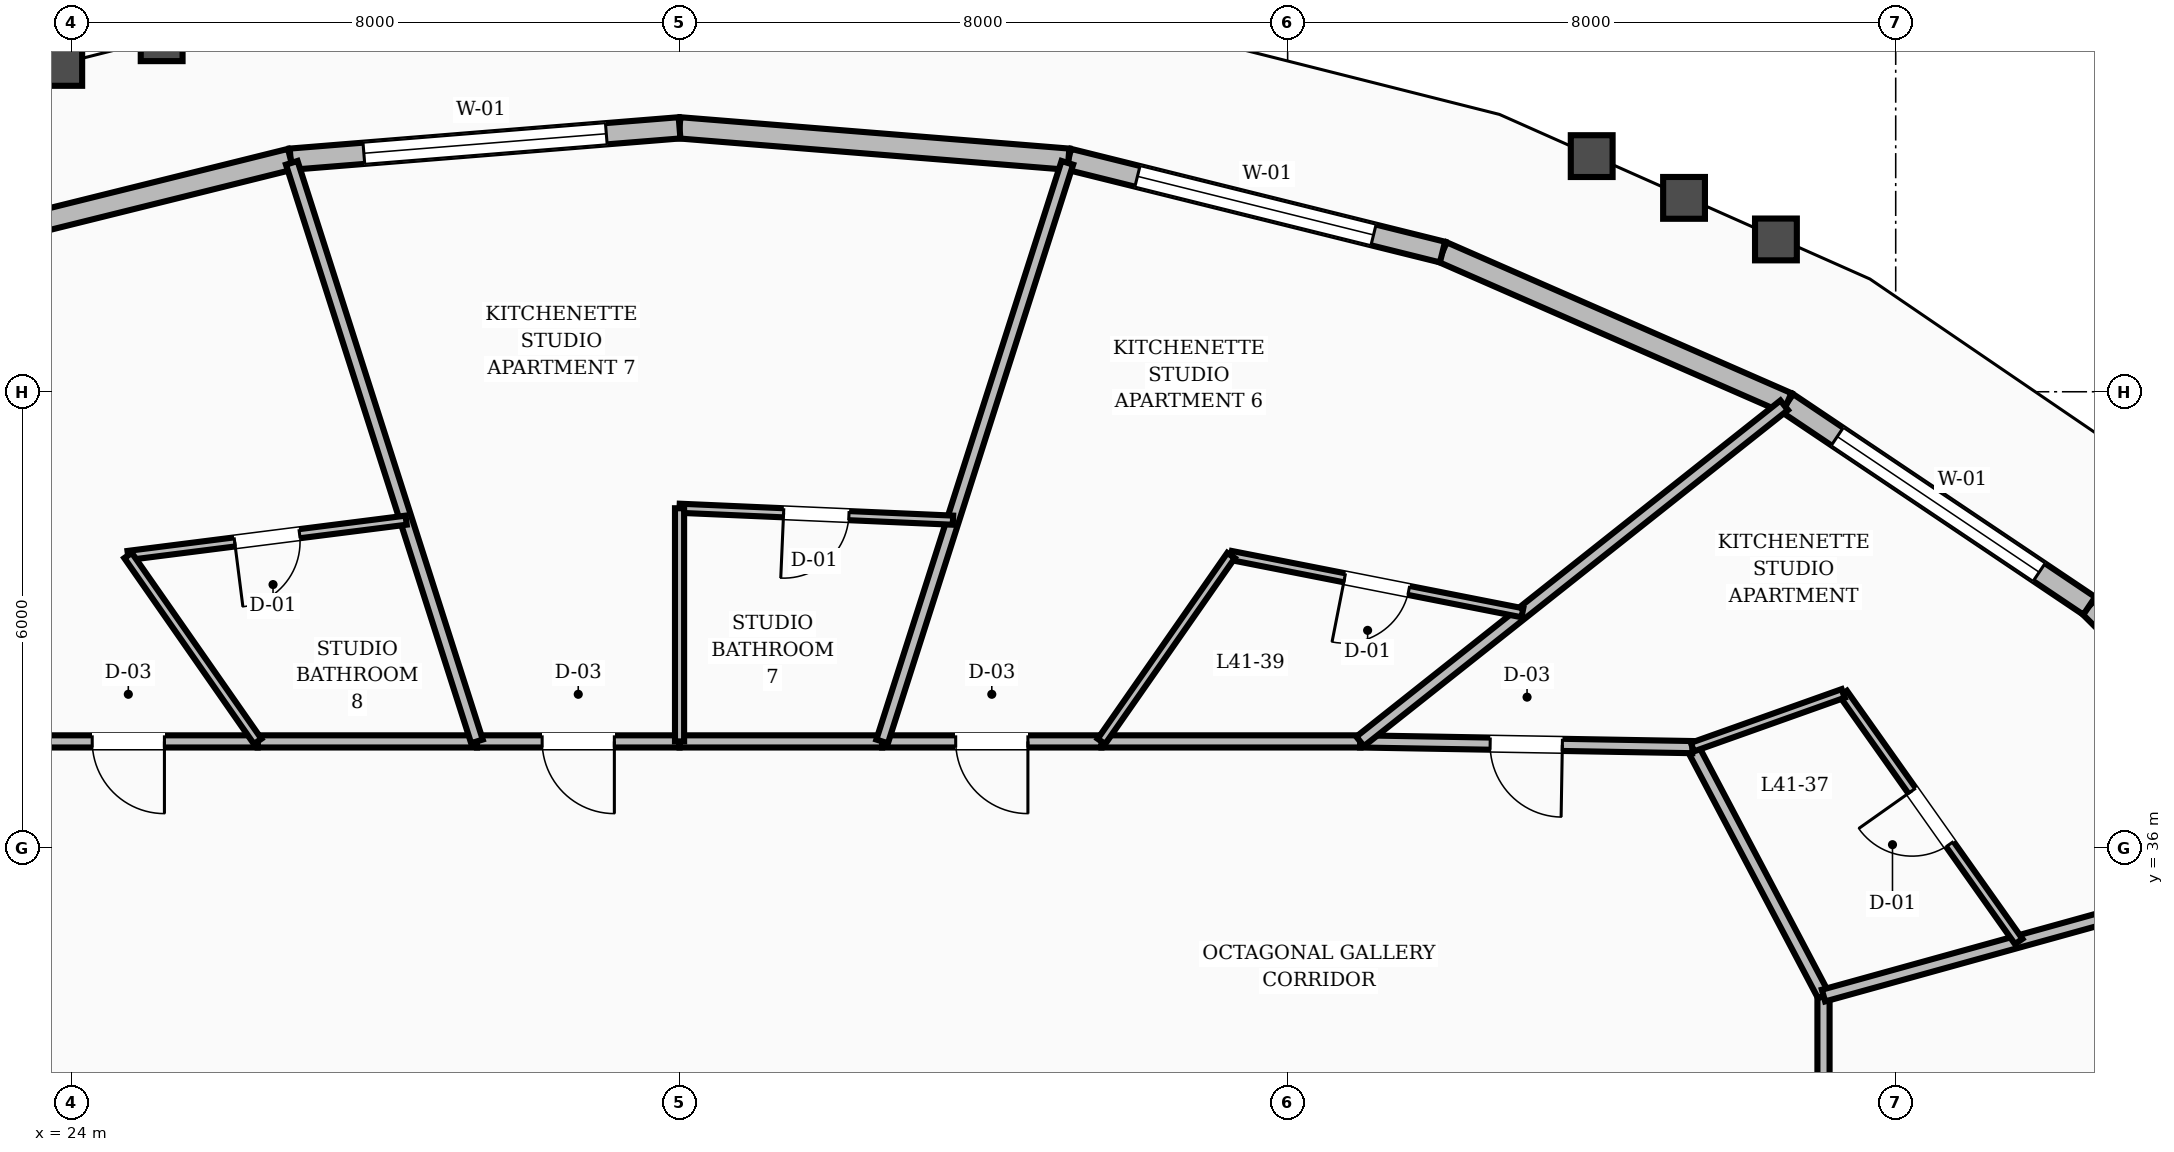
"""IFC4 building model, lengths in metres.
Left out: names, types, materials, properties, quantities, classifications, styles, units other than length and angle.
Written with IfcOpenShell. Run it as: python <this file> out.ifc"""

import sys

from ifc_helpers import new_model, si_unit, direction, frame, frame_2d, origin, place, context, subcontext, project, spatial, rectangle, extrude, element, fill, save


model = new_model("IFC4")
c1 = context("Model", 3, precision=1e-05, world=origin(), true_north=direction((0.0, 1.0)))
c2 = subcontext(c1, "Body", "Model", "MODEL_VIEW")
j1 = project(units=[si_unit("LENGTHUNIT", "METRE"), si_unit("PLANEANGLEUNIT", "RADIAN")], contexts=[c1])
p1 = place(None, origin())
s1 = spatial("IfcSite", under=j1, at=p1, CompositionType="ELEMENT")
p2 = place(p1, origin())
s2 = spatial("IfcBuilding", under=s1, at=p2, CompositionType="ELEMENT")
p3 = place(p2, frame((0.0, 0.0, 160.4)))
s3 = spatial("IfcBuildingStorey", under=s2, at=p3, CompositionType="ELEMENT", Elevation=160.4)
p4 = place(p3, frame((53.809, 35.929, 0.0), z_axis=(0.0, 0.0, 1.0), x_axis=(-0.707980552396, 0.706231928922, 0.0)))
e1 = element("IfcWall", 1, at=p4, inside=s3, PredefinedType="STANDARD", context=c2, shape_type="SweptSolid", body=[
    extrude(rectangle(XDim=4.607, YDim=0.28, at=frame_2d((2.304, 0.0))), origin(), (0.0, 0.0, 1.0), 2.82),
])
p5 = place(p3, frame((50.547, 39.183, 0.0), z_axis=(0.0, 0.0, 1.0), x_axis=(-0.830052550014, 0.557685183787, 0.0)))
e2 = element("IfcWall", 2, at=p5, inside=s3, PredefinedType="STANDARD", context=c2, shape_type="SweptSolid", body=[
    extrude(rectangle(XDim=4.788, YDim=0.28, at=frame_2d((2.394, 0.0))), origin(), (0.0, 0.0, 1.0), 2.82),
])
p6 = place(p5, frame((0.794, 0.0, 0.8)))
e3 = element("IfcOpeningElement", 3, at=p6, cuts=e2, PredefinedType="OPENING", context=c2, shape_type="SweptSolid", body=[
    extrude(rectangle(XDim=3.2, YDim=1.65, at=frame_2d((1.6, 0.825))), frame((0.0, 0.15, 0.0), z_axis=(0.0, -1.0, 0.0), x_axis=(1.0, 0.0, 0.0)), (0.0, 0.0, 1.0), 0.3),
])
p7 = place(p3, frame((46.572, 41.854, 0.0), z_axis=(0.0, 0.0, 1.0), x_axis=(-0.916141485862, 0.400855058447, 0.0)))
e4 = element("IfcWall", 4, at=p7, inside=s3, PredefinedType="STANDARD", context=c2, shape_type="SweptSolid", body=[
    extrude(rectangle(XDim=4.95, YDim=0.28, at=frame_2d((2.475, 0.0))), origin(), (0.0, 0.0, 1.0), 2.82),
])
p8 = place(p3, frame((42.037, 43.838, 0.0), z_axis=(0.0, 0.0, 1.0), x_axis=(-0.970520888712, 0.241017021336, 0.0)))
e5 = element("IfcWall", 5, at=p8, inside=s3, PredefinedType="STANDARD", context=c2, shape_type="SweptSolid", body=[
    extrude(rectangle(XDim=5.07, YDim=0.28, at=frame_2d((2.535, 0.0))), origin(), (0.0, 0.0, 1.0), 2.82),
])
p9 = place(p8, frame((0.935, 0.0, 0.8)))
e6 = element("IfcOpeningElement", 6, at=p9, cuts=e5, PredefinedType="OPENING", context=c2, shape_type="SweptSolid", body=[
    extrude(rectangle(XDim=3.2, YDim=1.65, at=frame_2d((1.6, 0.825))), frame((0.0, 0.15, 0.0), z_axis=(0.0, -1.0, 0.0), x_axis=(1.0, 0.0, 0.0)), (0.0, 0.0, 1.0), 0.3),
])
p10 = place(p3, frame((37.117, 45.06, 0.0), z_axis=(0.0, 0.0, 1.0), x_axis=(-0.996764876848, 0.080372758332, 0.0)))
e7 = element("IfcWall", 7, at=p10, inside=s3, PredefinedType="STANDARD", context=c2, shape_type="SweptSolid", body=[
    extrude(rectangle(XDim=5.134, YDim=0.28, at=frame_2d((2.567, 0.0))), origin(), (0.0, 0.0, 1.0), 2.82),
])
p11 = place(p3, frame((32.0, 45.472, 0.0), z_axis=(0.0, 0.0, 1.0), x_axis=(-0.996764876848, -0.080372758332, 0.0)))
e8 = element("IfcWall", 8, at=p11, inside=s3, PredefinedType="STANDARD", context=c2, shape_type="SweptSolid", body=[
    extrude(rectangle(XDim=5.134, YDim=0.28, at=frame_2d((2.567, 0.0))), origin(), (0.0, 0.0, 1.0), 2.82),
])
p12 = place(p11, frame((0.967, 0.0, 0.8)))
e9 = element("IfcOpeningElement", 9, at=p12, cuts=e8, PredefinedType="OPENING", context=c2, shape_type="SweptSolid", body=[
    extrude(rectangle(XDim=3.2, YDim=1.65, at=frame_2d((1.6, 0.825))), frame((0.0, 0.15, 0.0), z_axis=(0.0, -1.0, 0.0), x_axis=(1.0, 0.0, 0.0)), (0.0, 0.0, 1.0), 0.3),
])
p13 = place(p3, frame((26.883, 45.06, 0.0), z_axis=(0.0, 0.0, 1.0), x_axis=(-0.970520888712, -0.241017021336, 0.0)))
e10 = element("IfcWall", 10, at=p13, inside=s3, PredefinedType="STANDARD", context=c2, shape_type="SweptSolid", body=[
    extrude(rectangle(XDim=5.07, YDim=0.28, at=frame_2d((2.535, 0.0))), origin(), (0.0, 0.0, 1.0), 2.82),
])
p14 = place(p3, frame((47.05, 30.234, 0.0), z_axis=(0.0, 0.0, 1.0), x_axis=(0.0, 1.0, 0.0)))
e11 = element("IfcWall", 11, at=p14, inside=s3, PredefinedType="SOLIDWALL", context=c2, shape_type="SweptSolid", body=[
    extrude(rectangle(XDim=3.822, YDim=0.16, at=frame_2d((1.911, 0.0))), origin(), (0.0, 0.0, 1.0), 2.8),
])
p15 = place(p14, frame((1.436, 0.0, 0.0)))
e12 = element("IfcOpeningElement", 12, at=p15, cuts=e11, PredefinedType="OPENING", context=c2, shape_type="SweptSolid", body=[
    extrude(rectangle(XDim=0.95, YDim=2.1, at=frame_2d((0.475, 1.05))), frame((0.0, 0.09, 0.0), z_axis=(0.0, -1.0, 0.0), x_axis=(1.0, 0.0, 0.0)), (0.0, 0.0, 1.0), 0.18),
])
p16 = place(p3, frame((47.05, 34.056, 0.0), z_axis=(0.0, 0.0, 1.0), x_axis=(-0.466737093093, 0.884396113702, 0.0)))
e13 = element("IfcWall", 13, at=p16, inside=s3, PredefinedType="SOLIDWALL", context=c2, shape_type="SweptSolid", body=[
    extrude(rectangle(XDim=3.696, YDim=0.16, at=frame_2d((1.848, 0.0))), origin(), (0.0, 0.0, 1.0), 2.8),
])
p17 = place(p3, frame((45.325, 37.325, 0.0), z_axis=(0.0, 0.0, 1.0), x_axis=(-0.999853038912, 0.017143528788, 0.0)))
e14 = element("IfcWall", 14, at=p17, inside=s3, PredefinedType="SOLIDWALL", context=c2, shape_type="SweptSolid", body=[
    extrude(rectangle(XDim=4.372, YDim=0.16, at=frame_2d((2.186, 0.0))), origin(), (0.0, 0.0, 1.0), 2.8),
])
p18 = place(p17, frame((1.711, 0.0, 0.0)))
e15 = element("IfcOpeningElement", 15, at=p18, cuts=e14, PredefinedType="OPENING", context=c2, shape_type="SweptSolid", body=[
    extrude(rectangle(XDim=0.95, YDim=2.1, at=frame_2d((0.475, 1.05))), frame((0.0, 0.09, 0.0), z_axis=(0.0, -1.0, 0.0), x_axis=(1.0, 0.0, 0.0)), (0.0, 0.0, 1.0), 0.18),
])
p19 = place(p3, frame((40.954, 37.4, 0.0), z_axis=(0.0, 0.0, 1.0), x_axis=(-1.0, 0.0, 0.0)))
e16 = element("IfcWall", 16, at=p19, inside=s3, PredefinedType="SOLIDWALL", context=c2, shape_type="SweptSolid", body=[
    extrude(rectangle(XDim=3.403, YDim=0.16, at=frame_2d((1.702, 0.0))), origin(), (0.0, 0.0, 1.0), 2.8),
])
p20 = place(p3, frame((37.551, 37.4, 0.0), z_axis=(0.0, 0.0, 1.0), x_axis=(-1.0, 0.0, 0.0)))
e17 = element("IfcWall", 17, at=p20, inside=s3, PredefinedType="SOLIDWALL", context=c2, shape_type="SweptSolid", body=[
    extrude(rectangle(XDim=2.885, YDim=0.16, at=frame_2d((1.443, 0.0))), origin(), (0.0, 0.0, 1.0), 2.8),
])
p21 = place(p20, frame((0.968, 0.0, 0.0)))
e18 = element("IfcOpeningElement", 18, at=p21, cuts=e17, PredefinedType="OPENING", context=c2, shape_type="SweptSolid", body=[
    extrude(rectangle(XDim=0.95, YDim=2.1, at=frame_2d((0.475, 1.05))), frame((0.0, 0.09, 0.0), z_axis=(0.0, -1.0, 0.0), x_axis=(1.0, 0.0, 0.0)), (0.0, 0.0, 1.0), 0.18),
])
p22 = place(p3, frame((34.665, 37.4, 0.0), z_axis=(0.0, 0.0, 1.0), x_axis=(-1.0, 0.0, 0.0)))
e19 = element("IfcWall", 19, at=p22, inside=s3, PredefinedType="SOLIDWALL", context=c2, shape_type="SweptSolid", body=[
    extrude(rectangle(XDim=2.665, YDim=0.16, at=frame_2d((1.333, 0.0))), origin(), (0.0, 0.0, 1.0), 2.8),
])
p23 = place(p3, frame((32.0, 37.4, 0.0), z_axis=(0.0, 0.0, 1.0), x_axis=(-1.0, 0.0, 0.0)))
e20 = element("IfcWall", 20, at=p23, inside=s3, PredefinedType="SOLIDWALL", context=c2, shape_type="SweptSolid", body=[
    extrude(rectangle(XDim=2.665, YDim=0.16, at=frame_2d((1.333, 0.0))), origin(), (0.0, 0.0, 1.0), 2.8),
])
p24 = place(p23, frame((0.858, 0.0, 0.0)))
e21 = element("IfcOpeningElement", 21, at=p24, cuts=e20, PredefinedType="OPENING", context=c2, shape_type="SweptSolid", body=[
    extrude(rectangle(XDim=0.95, YDim=2.1, at=frame_2d((0.475, 1.05))), frame((0.0, 0.09, 0.0), z_axis=(0.0, -1.0, 0.0), x_axis=(1.0, 0.0, 0.0)), (0.0, 0.0, 1.0), 0.18),
])
p25 = place(p3, frame((29.335, 37.4, 0.0), z_axis=(0.0, 0.0, 1.0), x_axis=(-1.0, 0.0, 0.0)))
e22 = element("IfcWall", 22, at=p25, inside=s3, PredefinedType="SOLIDWALL", context=c2, shape_type="SweptSolid", body=[
    extrude(rectangle(XDim=2.885, YDim=0.16, at=frame_2d((1.443, 0.0))), origin(), (0.0, 0.0, 1.0), 2.8),
])
p26 = place(p3, frame((26.449, 37.4, 0.0), z_axis=(0.0, 0.0, 1.0), x_axis=(-1.0, 0.0, 0.0)))
e23 = element("IfcWall", 23, at=p26, inside=s3, PredefinedType="SOLIDWALL", context=c2, shape_type="SweptSolid", body=[
    extrude(rectangle(XDim=3.403, YDim=0.16, at=frame_2d((1.702, 0.0))), origin(), (0.0, 0.0, 1.0), 2.8),
])
p27 = place(p26, frame((1.227, 0.0, 0.0)))
e24 = element("IfcOpeningElement", 24, at=p27, cuts=e23, PredefinedType="OPENING", context=c2, shape_type="SweptSolid", body=[
    extrude(rectangle(XDim=0.95, YDim=2.1, at=frame_2d((0.475, 1.05))), frame((0.0, 0.09, 0.0), z_axis=(0.0, -1.0, 0.0), x_axis=(1.0, 0.0, 0.0)), (0.0, 0.0, 1.0), 0.18),
])
p28 = place(p3, frame((47.05, 34.056, 0.0), z_axis=(0.0, 0.0, 1.0), x_axis=(0.963668952893, 0.267099511848, 0.0)))
e25 = element("IfcWall", 25, at=p28, inside=s3, PredefinedType="SOLIDWALL", context=c2, shape_type="SweptSolid", body=[
    extrude(rectangle(XDim=6.963, YDim=0.16, at=frame_2d((3.481, 0.0))), origin(), (0.0, 0.0, 1.0), 2.8),
])
p29 = place(p3, frame((49.618, 34.768, 0.0), z_axis=(0.0, 0.0, 1.0), x_axis=(-0.577627537934, 0.816300451684, 0.0)))
e26 = element("IfcWall", 26, at=p29, inside=s3, PredefinedType="PARTITIONING", context=c2, shape_type="SweptSolid", body=[
    extrude(rectangle(XDim=3.998, YDim=0.12, at=frame_2d((1.999, 0.0))), origin(), (0.0, 0.0, 1.0), 2.8),
])
p30 = place(p29, frame((1.569, 0.0, 0.0)))
e27 = element("IfcOpeningElement", 27, at=p30, cuts=e26, PredefinedType="OPENING", context=c2, shape_type="SweptSolid", body=[
    extrude(rectangle(XDim=0.86, YDim=2.1, at=frame_2d((0.43, 1.05))), frame((0.0, 0.07, 0.0), z_axis=(0.0, -1.0, 0.0), x_axis=(1.0, 0.0, 0.0)), (0.0, 0.0, 1.0), 0.14),
])
p31 = place(p3, frame((45.325, 37.325, 0.0), z_axis=(0.0, 0.0, 1.0), x_axis=(0.942126837069, 0.335256652246, 0.0)))
e28 = element("IfcWall", 28, at=p31, inside=s3, PredefinedType="PARTITIONING", context=c2, shape_type="SweptSolid", body=[
    extrude(rectangle(XDim=2.106, YDim=0.12, at=frame_2d((1.053, 0.0))), origin(), (0.0, 0.0, 1.0), 2.8),
])
p32 = place(p3, frame((40.954, 37.4, 0.0), z_axis=(0.0, 0.0, 1.0), x_axis=(0.783647916584, 0.621205234068, 0.0)))
e29 = element("IfcWall", 29, at=p32, inside=s3, PredefinedType="SOLIDWALL", context=c2, shape_type="SweptSolid", body=[
    extrude(rectangle(XDim=7.119, YDim=0.16, at=frame_2d((3.56, 0.0))), origin(), (0.0, 0.0, 1.0), 2.8),
])
p33 = place(p3, frame((43.089, 39.092, 0.0), z_axis=(0.0, 0.0, 1.0), x_axis=(-0.981200665244, 0.192990296451, 0.0)))
e30 = element("IfcWall", 30, at=p33, inside=s3, PredefinedType="PARTITIONING", context=c2, shape_type="SweptSolid", body=[
    extrude(rectangle(XDim=3.906, YDim=0.12, at=frame_2d((1.953, 0.0))), origin(), (0.0, 0.0, 1.0), 2.8),
])
p34 = place(p33, frame((1.523, 0.0, 0.0)))
e31 = element("IfcOpeningElement", 31, at=p34, cuts=e30, PredefinedType="OPENING", context=c2, shape_type="SweptSolid", body=[
    extrude(rectangle(XDim=0.86, YDim=2.1, at=frame_2d((0.43, 1.05))), frame((0.0, 0.07, 0.0), z_axis=(0.0, -1.0, 0.0), x_axis=(1.0, 0.0, 0.0)), (0.0, 0.0, 1.0), 0.14),
])
p35 = place(p3, frame((37.551, 37.4, 0.0), z_axis=(0.0, 0.0, 1.0), x_axis=(0.571812700065, 0.820384200265, 0.0)))
e32 = element("IfcWall", 32, at=p35, inside=s3, PredefinedType="PARTITIONING", context=c2, shape_type="SweptSolid", body=[
    extrude(rectangle(XDim=2.982, YDim=0.12, at=frame_2d((1.491, 0.0))), origin(), (0.0, 0.0, 1.0), 2.8),
])
p36 = place(p3, frame((34.665, 37.4, 0.0), z_axis=(0.0, 0.0, 1.0), x_axis=(0.304851094137, 0.952400026461, 0.0)))
e33 = element("IfcWall", 33, at=p36, inside=s3, PredefinedType="SOLIDWALL", context=c2, shape_type="SweptSolid", body=[
    extrude(rectangle(XDim=7.992, YDim=0.16, at=frame_2d((3.996, 0.0))), origin(), (0.0, 0.0, 1.0), 2.8),
])
p37 = place(p3, frame((35.597, 40.311, 0.0), z_axis=(0.0, 0.0, 1.0), x_axis=(-0.999051931473, 0.043534333809, 0.0)))
e34 = element("IfcWall", 34, at=p37, inside=s3, PredefinedType="PARTITIONING", context=c2, shape_type="SweptSolid", body=[
    extrude(rectangle(XDim=3.6, YDim=0.12, at=frame_2d((1.8, 0.0))), origin(), (0.0, 0.0, 1.0), 2.8),
])
p38 = place(p37, frame((1.37, 0.0, 0.0)))
e35 = element("IfcOpeningElement", 35, at=p38, cuts=e34, PredefinedType="OPENING", context=c2, shape_type="SweptSolid", body=[
    extrude(rectangle(XDim=0.86, YDim=2.1, at=frame_2d((0.43, 1.05))), frame((0.0, 0.07, 0.0), z_axis=(0.0, -1.0, 0.0), x_axis=(1.0, 0.0, 0.0)), (0.0, 0.0, 1.0), 0.14),
])
p39 = place(p3, frame((32.0, 37.4, 0.0), z_axis=(0.0, 0.0, 1.0), x_axis=(0.0, 1.0, 0.0)))
e36 = element("IfcWall", 36, at=p39, inside=s3, PredefinedType="PARTITIONING", context=c2, shape_type="SweptSolid", body=[
    extrude(rectangle(XDim=3.067, YDim=0.12, at=frame_2d((1.534, 0.0))), origin(), (0.0, 0.0, 1.0), 2.8),
])
p40 = place(p3, frame((29.335, 37.4, 0.0), z_axis=(0.0, 0.0, 1.0), x_axis=(-0.304851094137, 0.952400026461, 0.0)))
e37 = element("IfcWall", 37, at=p40, inside=s3, PredefinedType="SOLIDWALL", context=c2, shape_type="SweptSolid", body=[
    extrude(rectangle(XDim=7.992, YDim=0.16, at=frame_2d((3.996, 0.0))), origin(), (0.0, 0.0, 1.0), 2.8),
])
p41 = place(p3, frame((28.403, 40.311, 0.0), z_axis=(0.0, 0.0, 1.0), x_axis=(-0.992041868523, -0.125908423457, 0.0)))
e38 = element("IfcWall", 38, at=p41, inside=s3, PredefinedType="PARTITIONING", context=c2, shape_type="SweptSolid", body=[
    extrude(rectangle(XDim=3.688, YDim=0.12, at=frame_2d((1.844, 0.0))), origin(), (0.0, 0.0, 1.0), 2.8),
])
p42 = place(p41, frame((1.414, 0.0, 0.0)))
e39 = element("IfcOpeningElement", 39, at=p42, cuts=e38, PredefinedType="OPENING", context=c2, shape_type="SweptSolid", body=[
    extrude(rectangle(XDim=0.86, YDim=2.1, at=frame_2d((0.43, 1.05))), frame((0.0, 0.07, 0.0), z_axis=(0.0, -1.0, 0.0), x_axis=(1.0, 0.0, 0.0)), (0.0, 0.0, 1.0), 0.14),
])
p43 = place(p3, frame((26.449, 37.4, 0.0), z_axis=(0.0, 0.0, 1.0), x_axis=(-0.571812700065, 0.820384200265, 0.0)))
e40 = element("IfcWall", 40, at=p43, inside=s3, PredefinedType="PARTITIONING", context=c2, shape_type="SweptSolid", body=[
    extrude(rectangle(XDim=2.982, YDim=0.12, at=frame_2d((1.491, 0.0))), origin(), (0.0, 0.0, 1.0), 2.8),
])
p44 = place(p6, origin())
e41 = element("IfcWindow", 41, at=p44, inside=s3, PartitioningType="SINGLE_PANEL", PredefinedType="WINDOW", context=c2, shape_type="SweptSolid", body=[
    extrude(rectangle(XDim=3.2, YDim=1.65, at=frame_2d((1.6, 0.825))), frame((0.0, 0.03, 0.0), z_axis=(0.0, -1.0, 0.0), x_axis=(1.0, 0.0, 0.0)), (0.0, 0.0, 1.0), 0.06),
])
fill(e3, e41)
p45 = place(p9, origin())
e42 = element("IfcWindow", 42, at=p45, inside=s3, PartitioningType="SINGLE_PANEL", PredefinedType="WINDOW", context=c2, shape_type="SweptSolid", body=[
    extrude(rectangle(XDim=3.2, YDim=1.65, at=frame_2d((1.6, 0.825))), frame((0.0, 0.03, 0.0), z_axis=(0.0, -1.0, 0.0), x_axis=(1.0, 0.0, 0.0)), (0.0, 0.0, 1.0), 0.06),
])
fill(e6, e42)
p46 = place(p12, origin())
e43 = element("IfcWindow", 43, at=p46, inside=s3, PartitioningType="SINGLE_PANEL", PredefinedType="WINDOW", context=c2, shape_type="SweptSolid", body=[
    extrude(rectangle(XDim=3.2, YDim=1.65, at=frame_2d((1.6, 0.825))), frame((0.0, 0.03, 0.0), z_axis=(0.0, -1.0, 0.0), x_axis=(1.0, 0.0, 0.0)), (0.0, 0.0, 1.0), 0.06),
])
fill(e9, e43)
p47 = place(p30, origin())
e44 = element("IfcDoor", 44, at=p47, inside=s3, OperationType="SINGLE_SWING_RIGHT", PredefinedType="DOOR", context=c2, shape_type="SweptSolid", body=[
    extrude(rectangle(XDim=0.86, YDim=2.1, at=frame_2d((0.43, 1.05))), frame((0.0, 0.025, 0.0), z_axis=(0.0, -1.0, 0.0), x_axis=(1.0, 0.0, 0.0)), (0.0, 0.0, 1.0), 0.05),
])
fill(e27, e44)
p48 = place(p18, origin())
e45 = element("IfcDoor", 45, at=p48, inside=s3, OperationType="SINGLE_SWING_LEFT", PredefinedType="DOOR", context=c2, shape_type="SweptSolid", body=[
    extrude(rectangle(XDim=0.95, YDim=2.1, at=frame_2d((0.475, 1.05))), frame((0.0, 0.025, 0.0), z_axis=(0.0, -1.0, 0.0), x_axis=(1.0, 0.0, 0.0)), (0.0, 0.0, 1.0), 0.05),
])
fill(e15, e45)
p49 = place(p34, origin())
e46 = element("IfcDoor", 46, at=p49, inside=s3, OperationType="SINGLE_SWING_RIGHT", PredefinedType="DOOR", context=c2, shape_type="SweptSolid", body=[
    extrude(rectangle(XDim=0.86, YDim=2.1, at=frame_2d((0.43, 1.05))), frame((0.0, 0.025, 0.0), z_axis=(0.0, -1.0, 0.0), x_axis=(1.0, 0.0, 0.0)), (0.0, 0.0, 1.0), 0.05),
])
fill(e31, e46)
p50 = place(p21, origin())
e47 = element("IfcDoor", 47, at=p50, inside=s3, OperationType="SINGLE_SWING_LEFT", PredefinedType="DOOR", context=c2, shape_type="SweptSolid", body=[
    extrude(rectangle(XDim=0.95, YDim=2.1, at=frame_2d((0.475, 1.05))), frame((0.0, 0.025, 0.0), z_axis=(0.0, -1.0, 0.0), x_axis=(1.0, 0.0, 0.0)), (0.0, 0.0, 1.0), 0.05),
])
fill(e18, e47)
p51 = place(p38, origin())
e48 = element("IfcDoor", 48, at=p51, inside=s3, OperationType="SINGLE_SWING_RIGHT", PredefinedType="DOOR", context=c2, shape_type="SweptSolid", body=[
    extrude(rectangle(XDim=0.86, YDim=2.1, at=frame_2d((0.43, 1.05))), frame((0.0, 0.025, 0.0), z_axis=(0.0, -1.0, 0.0), x_axis=(1.0, 0.0, 0.0)), (0.0, 0.0, 1.0), 0.05),
])
fill(e35, e48)
p52 = place(p24, origin())
e49 = element("IfcDoor", 49, at=p52, inside=s3, OperationType="SINGLE_SWING_LEFT", PredefinedType="DOOR", context=c2, shape_type="SweptSolid", body=[
    extrude(rectangle(XDim=0.95, YDim=2.1, at=frame_2d((0.475, 1.05))), frame((0.0, 0.025, 0.0), z_axis=(0.0, -1.0, 0.0), x_axis=(1.0, 0.0, 0.0)), (0.0, 0.0, 1.0), 0.05),
])
fill(e21, e49)
p53 = place(p42, origin())
e50 = element("IfcDoor", 50, at=p53, inside=s3, OperationType="SINGLE_SWING_RIGHT", PredefinedType="DOOR", context=c2, shape_type="SweptSolid", body=[
    extrude(rectangle(XDim=0.86, YDim=2.1, at=frame_2d((0.43, 1.05))), frame((0.0, 0.025, 0.0), z_axis=(0.0, -1.0, 0.0), x_axis=(1.0, 0.0, 0.0)), (0.0, 0.0, 1.0), 0.05),
])
fill(e39, e50)
p54 = place(p27, origin())
e51 = element("IfcDoor", 51, at=p54, inside=s3, OperationType="SINGLE_SWING_LEFT", PredefinedType="DOOR", context=c2, shape_type="SweptSolid", body=[
    extrude(rectangle(XDim=0.95, YDim=2.1, at=frame_2d((0.475, 1.05))), frame((0.0, 0.025, 0.0), z_axis=(0.0, -1.0, 0.0), x_axis=(1.0, 0.0, 0.0)), (0.0, 0.0, 1.0), 0.05),
])
fill(e24, e51)
save(model, sys.argv[1])
